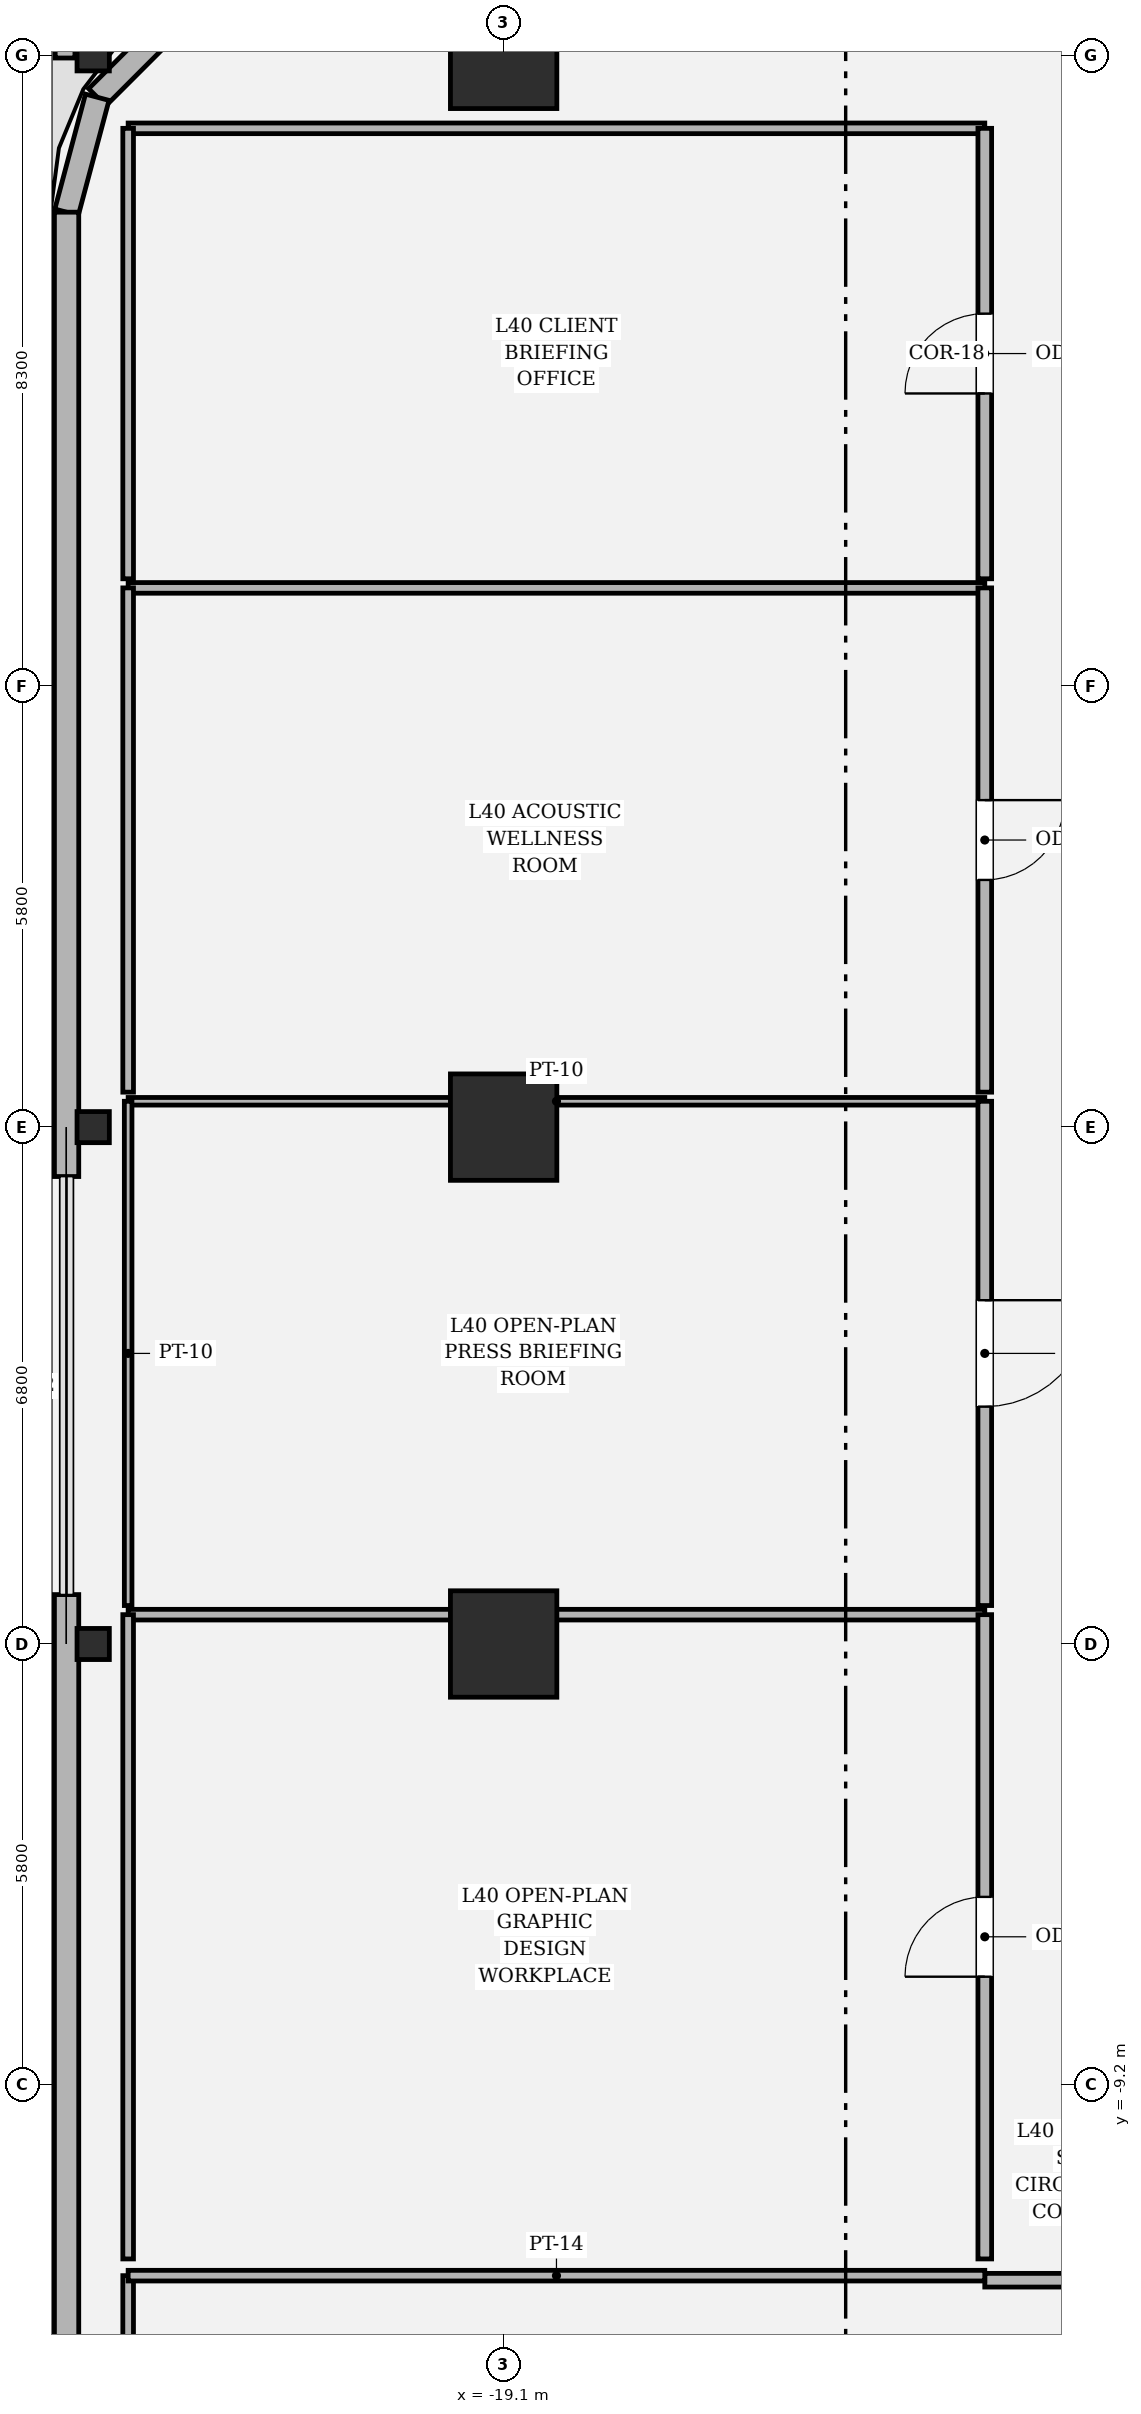
"""IFC4 building model, lengths in metres.
Left out: names, types, materials, properties, quantities, classifications, styles, units other than length and angle.
Written with IfcOpenShell. Run it as: python <this file> out.ifc"""

import sys

from ifc_helpers import new_model, si_unit, direction, frame, frame_2d, origin, origin_2d, place, context, subcontext, project, spatial, rectangle, hollow_rectangle, i_section, extrude, element, fill, save


model = new_model("IFC4")
c1 = context("Model", 3, precision=1e-05, world=origin(), true_north=direction((0.0, 1.0)))
c2 = subcontext(c1, "Body", "Model", "MODEL_VIEW")
j1 = project(units=[si_unit("LENGTHUNIT", "METRE"), si_unit("PLANEANGLEUNIT", "RADIAN")], contexts=[c1])
p1 = place(None, origin())
s1 = spatial("IfcSite", under=j1, at=p1, CompositionType="ELEMENT")
p2 = place(p1, origin())
s2 = spatial("IfcBuilding", under=s1, at=p2, CompositionType="ELEMENT")
p3 = place(p2, frame((0.0, 0.0, 172.2)))
s3 = spatial("IfcBuildingStorey", under=s2, at=p3, CompositionType="ELEMENT", Elevation=172.2)
for number, where, z_axis, x_axis in (
    (1, (-19.1, 17.5, 0.0), (0.0, 0.0, 1.0), (1.0, 0.0, 0.0)),
    (2, (-19.1, 3.4, 0.0), (0.0, 0.0, 1.0), (1.0, 0.0, 0.0)),
    (3, (-19.1, -3.4, 0.0), (0.0, 0.0, 1.0), (1.0, 0.0, 0.0)),
):
    element("IfcColumn", number, at=place(p3, frame(where, z_axis=z_axis, x_axis=x_axis)), inside=s3, PredefinedType="COLUMN", context=c2, shape_type="SweptSolid", body=[
        extrude(hollow_rectangle(XDim=1.4, YDim=1.4, WallThickness=0.042, at=origin_2d()), origin(), (0.0, 0.0, 1.0), 4.05),
    ])
for number, where, z_axis, x_axis in (
    (4, (-24.5, -3.4, 0.0), (0.0, 0.0, 1.0), (0.0, 1.0, 0.0)),
    (5, (-24.5, 3.4, 0.0), (0.0, 0.0, 1.0), (0.0, 1.0, 0.0)),
    (6, (-24.5, 17.5, 0.0), (0.0, 0.0, 1.0), (0.0, 1.0, 0.0)),
):
    element("IfcColumn", number, at=place(p3, frame(where, z_axis=z_axis, x_axis=x_axis)), inside=s3, PredefinedType="COLUMN", context=c2, shape_type="SweptSolid", body=[
        extrude(i_section(OverallWidth=0.409, OverallDepth=0.425, WebThickness=0.032, FlangeThickness=0.052, FilletRadius=0.018, at=origin_2d()), origin(), (0.0, 0.0, 1.0), 4.048),
    ])
p4 = place(p3, frame((-23.349, 18.047, 0.0), z_axis=(0.0, 0.0, 1.0), x_axis=(-0.707106781187, -0.707106781187, 0.0)))
e7 = element("IfcWall", 7, at=p4, inside=s3, PredefinedType="SOLIDWALL", context=c2, shape_type="SweptSolid", body=[
    extrude(rectangle(XDim=1.552, YDim=0.32, at=frame_2d((0.776, 0.0))), origin(), (0.0, 0.0, 1.0), 2.504),
])
p5 = place(p3, frame((-24.447, 16.949, 0.0), z_axis=(0.0, 0.0, 1.0), x_axis=(-0.257847112249, -0.966185730957, 0.0)))
e8 = element("IfcWall", 8, at=p5, inside=s3, PredefinedType="SOLIDWALL", context=c2, shape_type="SweptSolid", body=[
    extrude(rectangle(XDim=1.565, YDim=0.32, at=frame_2d((0.783, 0.0))), origin(), (0.0, 0.0, 1.0), 2.544),
])
p6 = place(p3, frame((-24.85, 15.437, 0.0), z_axis=(0.0, 0.0, 1.0), x_axis=(0.0, -1.0, 0.0)))
e9 = element("IfcWall", 9, at=p6, inside=s3, PredefinedType="SOLIDWALL", context=c2, shape_type="SweptSolid", body=[
    extrude(rectangle(XDim=12.687, YDim=0.32, at=frame_2d((6.344, 0.0))), origin(), (0.0, 0.0, 1.0), 2.544),
])
p7 = place(p3, frame((-24.85, -2.75, 0.0), z_axis=(0.0, 0.0, 1.0), x_axis=(0.0, -1.0, 0.0)))
e10 = element("IfcWall", 10, at=p7, inside=s3, PredefinedType="SOLIDWALL", context=c2, shape_type="SweptSolid", body=[
    extrude(rectangle(XDim=17.487, YDim=0.32, at=frame_2d((8.743, 0.0))), origin(), (0.0, 0.0, 1.0), 2.544),
])
p8 = place(p3, frame((-24.87, 20.238, 0.0), z_axis=(0.0, 0.0, 1.0), x_axis=(0.0, -1.0, 0.0)))
e11 = element("IfcWall", 11, at=p8, inside=s3, PredefinedType="PARAPET", context=c2, shape_type="SweptSolid", body=[
    extrude(rectangle(XDim=2.773, YDim=0.26, at=frame_2d((1.387, 0.0))), origin(), (0.0, 0.0, 1.0), 1.2),
])
p9 = place(p3, frame((-12.77, -11.77, 0.0), z_axis=(0.0, 0.0, 1.0), x_axis=(1.0, 0.0, 0.0)))
e12 = element("IfcWall", 12, at=p9, inside=s3, PredefinedType="PARTITIONING", context=c2, shape_type="SweptSolid", body=[
    extrude(rectangle(XDim=10.31, YDim=0.18, at=frame_2d((5.155, 0.0))), origin(), (0.0, 0.0, 1.0), 3.174),
])
p10 = place(p9, frame((4.63, 0.0, 0.0)))
e13 = element("IfcOpeningElement", 13, at=p10, cuts=e12, PredefinedType="OPENING", context=c2, shape_type="SweptSolid", body=[
    extrude(rectangle(XDim=1.05, YDim=2.2, at=frame_2d((0.525, 1.1))), frame((0.0, 0.1, 0.0), z_axis=(0.0, -1.0, 0.0), x_axis=(1.0, 0.0, 0.0)), (0.0, 0.0, 1.0), 0.2),
])
p11 = place(p3, frame((-24.04, -22.147, 0.0), z_axis=(0.0, 0.0, 1.0), x_axis=(0.0, 1.0, 0.0)))
e14 = element("IfcWall", 14, at=p11, inside=s3, PredefinedType="PARTITIONING", context=c2, shape_type="SweptSolid", body=[
    extrude(rectangle(XDim=10.438, YDim=0.14, at=frame_2d((5.219, 0.0))), origin(), (0.0, 0.0, 1.0), 2.504),
])
p12 = place(p3, frame((-24.04, -11.71, 0.0), z_axis=(0.0, 0.0, 1.0), x_axis=(1.0, 0.0, 0.0)))
e15 = element("IfcWall", 15, at=p12, inside=s3, PredefinedType="PARTITIONING", context=c2, shape_type="SweptSolid", body=[
    extrude(rectangle(XDim=11.27, YDim=0.14, at=frame_2d((5.635, 0.0))), origin(), (0.0, 0.0, 1.0), 3.174),
])
p13 = place(p3, frame((-24.04, -3.014, 0.0), z_axis=(0.0, 0.0, 1.0), x_axis=(1.0, 0.0, 0.0)))
e16 = element("IfcWall", 16, at=p13, inside=s3, PredefinedType="PARTITIONING", context=c2, shape_type="SweptSolid", body=[
    extrude(rectangle(XDim=11.27, YDim=0.14, at=frame_2d((5.635, 0.0))), origin(), (0.0, 0.0, 1.0), 2.504),
])
p14 = place(p3, frame((-12.77, -3.014, 0.0), z_axis=(0.0, 0.0, 1.0), x_axis=(0.0, -1.0, 0.0)))
e17 = element("IfcWall", 17, at=p14, inside=s3, PredefinedType="PARTITIONING", context=c2, shape_type="SweptSolid", body=[
    extrude(rectangle(XDim=8.476, YDim=0.18, at=frame_2d((4.238, 0.0))), origin(), (0.0, 0.0, 1.0), 3.174),
])
p15 = place(p14, frame((3.713, 0.0, 0.0)))
e18 = element("IfcOpeningElement", 18, at=p15, cuts=e17, PredefinedType="OPENING", context=c2, shape_type="SweptSolid", body=[
    extrude(rectangle(XDim=1.05, YDim=2.2, at=frame_2d((0.525, 1.1))), frame((0.0, 0.1, 0.0), z_axis=(0.0, -1.0, 0.0), x_axis=(1.0, 0.0, 0.0)), (0.0, 0.0, 1.0), 0.2),
])
p16 = place(p3, frame((-24.04, -11.49, 0.0), z_axis=(0.0, 0.0, 1.0), x_axis=(0.0, 1.0, 0.0)))
e19 = element("IfcWall", 19, at=p16, inside=s3, PredefinedType="PARTITIONING", context=c2, shape_type="SweptSolid", body=[
    extrude(rectangle(XDim=8.476, YDim=0.14, at=frame_2d((4.238, 0.0))), origin(), (0.0, 0.0, 1.0), 2.504),
])
p17 = place(p3, frame((-24.04, 3.74, 0.0), z_axis=(0.0, 0.0, 1.0), x_axis=(1.0, 0.0, 0.0)))
e20 = element("IfcWall", 20, at=p17, inside=s3, PredefinedType="PARTITIONING", context=c2, shape_type="SweptSolid", body=[
    extrude(rectangle(XDim=11.27, YDim=0.1, at=frame_2d((5.635, 0.0))), origin(), (0.0, 0.0, 1.0), 2.504),
])
p18 = place(p3, frame((-12.77, 3.74, 0.0), z_axis=(0.0, 0.0, 1.0), x_axis=(0.0, -1.0, 0.0)))
e21 = element("IfcWall", 21, at=p18, inside=s3, PredefinedType="PARTITIONING", context=c2, shape_type="SweptSolid", body=[
    extrude(rectangle(XDim=6.634, YDim=0.18, at=frame_2d((3.317, 0.0))), origin(), (0.0, 0.0, 1.0), 3.174),
])
p19 = place(p18, frame((2.617, 0.0, 0.0)))
e22 = element("IfcOpeningElement", 22, at=p19, cuts=e21, PredefinedType="OPENING", context=c2, shape_type="SweptSolid", body=[
    extrude(rectangle(XDim=1.4, YDim=2.25, at=frame_2d((0.7, 1.125))), frame((0.0, 0.1, 0.0), z_axis=(0.0, -1.0, 0.0), x_axis=(1.0, 0.0, 0.0)), (0.0, 0.0, 1.0), 0.2),
])
p20 = place(p3, frame((-24.04, -2.894, 0.0), z_axis=(0.0, 0.0, 1.0), x_axis=(0.0, 1.0, 0.0)))
e23 = element("IfcWall", 23, at=p20, inside=s3, PredefinedType="PARTITIONING", context=c2, shape_type="SweptSolid", body=[
    extrude(rectangle(XDim=6.634, YDim=0.1, at=frame_2d((3.317, 0.0))), origin(), (0.0, 0.0, 1.0), 2.504),
])
p21 = place(p3, frame((-24.04, 10.494, 0.0), z_axis=(0.0, 0.0, 1.0), x_axis=(1.0, 0.0, 0.0)))
e24 = element("IfcWall", 24, at=p21, inside=s3, PredefinedType="PARTITIONING", context=c2, shape_type="SweptSolid", body=[
    extrude(rectangle(XDim=11.27, YDim=0.14, at=frame_2d((5.635, 0.0))), origin(), (0.0, 0.0, 1.0), 3.174),
])
p22 = place(p3, frame((-12.77, 10.494, 0.0), z_axis=(0.0, 0.0, 1.0), x_axis=(0.0, -1.0, 0.0)))
e25 = element("IfcWall", 25, at=p22, inside=s3, PredefinedType="PARTITIONING", context=c2, shape_type="SweptSolid", body=[
    extrude(rectangle(XDim=6.634, YDim=0.18, at=frame_2d((3.317, 0.0))), origin(), (0.0, 0.0, 1.0), 3.174),
])
p23 = place(p22, frame((2.792, 0.0, 0.0)))
e26 = element("IfcOpeningElement", 26, at=p23, cuts=e25, PredefinedType="OPENING", context=c2, shape_type="SweptSolid", body=[
    extrude(rectangle(XDim=1.05, YDim=2.2, at=frame_2d((0.525, 1.1))), frame((0.0, 0.1, 0.0), z_axis=(0.0, -1.0, 0.0), x_axis=(1.0, 0.0, 0.0)), (0.0, 0.0, 1.0), 0.2),
])
p24 = place(p3, frame((-24.04, 3.86, 0.0), z_axis=(0.0, 0.0, 1.0), x_axis=(0.0, 1.0, 0.0)))
e27 = element("IfcWall", 27, at=p24, inside=s3, PredefinedType="PARTITIONING", context=c2, shape_type="SweptSolid", body=[
    extrude(rectangle(XDim=6.634, YDim=0.14, at=frame_2d((3.317, 0.0))), origin(), (0.0, 0.0, 1.0), 3.83),
])
p25 = place(p3, frame((-24.04, 16.54, 0.0), z_axis=(0.0, 0.0, 1.0), x_axis=(1.0, 0.0, 0.0)))
e28 = element("IfcWall", 28, at=p25, inside=s3, PredefinedType="PARTITIONING", context=c2, shape_type="SweptSolid", body=[
    extrude(rectangle(XDim=11.27, YDim=0.14, at=frame_2d((5.635, 0.0))), origin(), (0.0, 0.0, 1.0), 3.174),
])
p26 = place(p3, frame((-12.77, 16.54, 0.0), z_axis=(0.0, 0.0, 1.0), x_axis=(0.0, -1.0, 0.0)))
e29 = element("IfcWall", 29, at=p26, inside=s3, PredefinedType="PARTITIONING", context=c2, shape_type="SweptSolid", body=[
    extrude(rectangle(XDim=5.926, YDim=0.18, at=frame_2d((2.963, 0.0))), origin(), (0.0, 0.0, 1.0), 3.424),
])
p27 = place(p26, frame((2.438, 0.0, 0.0)))
e30 = element("IfcOpeningElement", 30, at=p27, cuts=e29, PredefinedType="OPENING", context=c2, shape_type="SweptSolid", body=[
    extrude(rectangle(XDim=1.05, YDim=2.2, at=frame_2d((0.525, 1.1))), frame((0.0, 0.1, 0.0), z_axis=(0.0, -1.0, 0.0), x_axis=(1.0, 0.0, 0.0)), (0.0, 0.0, 1.0), 0.2),
])
p28 = place(p3, frame((-24.04, 10.614, 0.0), z_axis=(0.0, 0.0, 1.0), x_axis=(0.0, 1.0, 0.0)))
e31 = element("IfcWall", 31, at=p28, inside=s3, PredefinedType="PARTITIONING", context=c2, shape_type="SweptSolid", body=[
    extrude(rectangle(XDim=5.926, YDim=0.14, at=frame_2d((2.963, 0.0))), origin(), (0.0, 0.0, 1.0), 3.83),
])
p29 = place(p15, origin())
e32 = element("IfcDoor", 32, at=p29, inside=s3, OperationType="SINGLE_SWING_RIGHT", PredefinedType="DOOR", context=c2, shape_type="SweptSolid", body=[
    extrude(rectangle(XDim=1.05, YDim=2.2, at=frame_2d((0.525, 1.1))), frame((0.0, 0.025, 0.0), z_axis=(0.0, -1.0, 0.0), x_axis=(1.0, 0.0, 0.0)), (0.0, 0.0, 1.0), 0.05),
])
fill(e18, e32)
p30 = place(p19, origin())
e33 = element("IfcDoor", 33, at=p30, inside=s3, OperationType="SINGLE_SWING_LEFT", PredefinedType="DOOR", context=c2, shape_type="SweptSolid", body=[
    extrude(rectangle(XDim=1.4, YDim=2.25, at=frame_2d((0.7, 1.125))), frame((0.0, 0.025, 0.0), z_axis=(0.0, -1.0, 0.0), x_axis=(1.0, 0.0, 0.0)), (0.0, 0.0, 1.0), 0.05),
])
fill(e22, e33)
p31 = place(p23, origin())
e34 = element("IfcDoor", 34, at=p31, inside=s3, OperationType="SINGLE_SWING_LEFT", PredefinedType="DOOR", context=c2, shape_type="SweptSolid", body=[
    extrude(rectangle(XDim=1.05, YDim=2.2, at=frame_2d((0.525, 1.1))), frame((0.0, 0.025, 0.0), z_axis=(0.0, -1.0, 0.0), x_axis=(1.0, 0.0, 0.0)), (0.0, 0.0, 1.0), 0.05),
])
fill(e26, e34)
p32 = place(p27, origin())
e35 = element("IfcDoor", 35, at=p32, inside=s3, OperationType="SINGLE_SWING_RIGHT", PredefinedType="DOOR", context=c2, shape_type="SweptSolid", body=[
    extrude(rectangle(XDim=1.05, YDim=2.2, at=frame_2d((0.525, 1.1))), frame((0.0, 0.025, 0.0), z_axis=(0.0, -1.0, 0.0), x_axis=(1.0, 0.0, 0.0)), (0.0, 0.0, 1.0), 0.05),
])
fill(e30, e35)
save(model, sys.argv[1])
